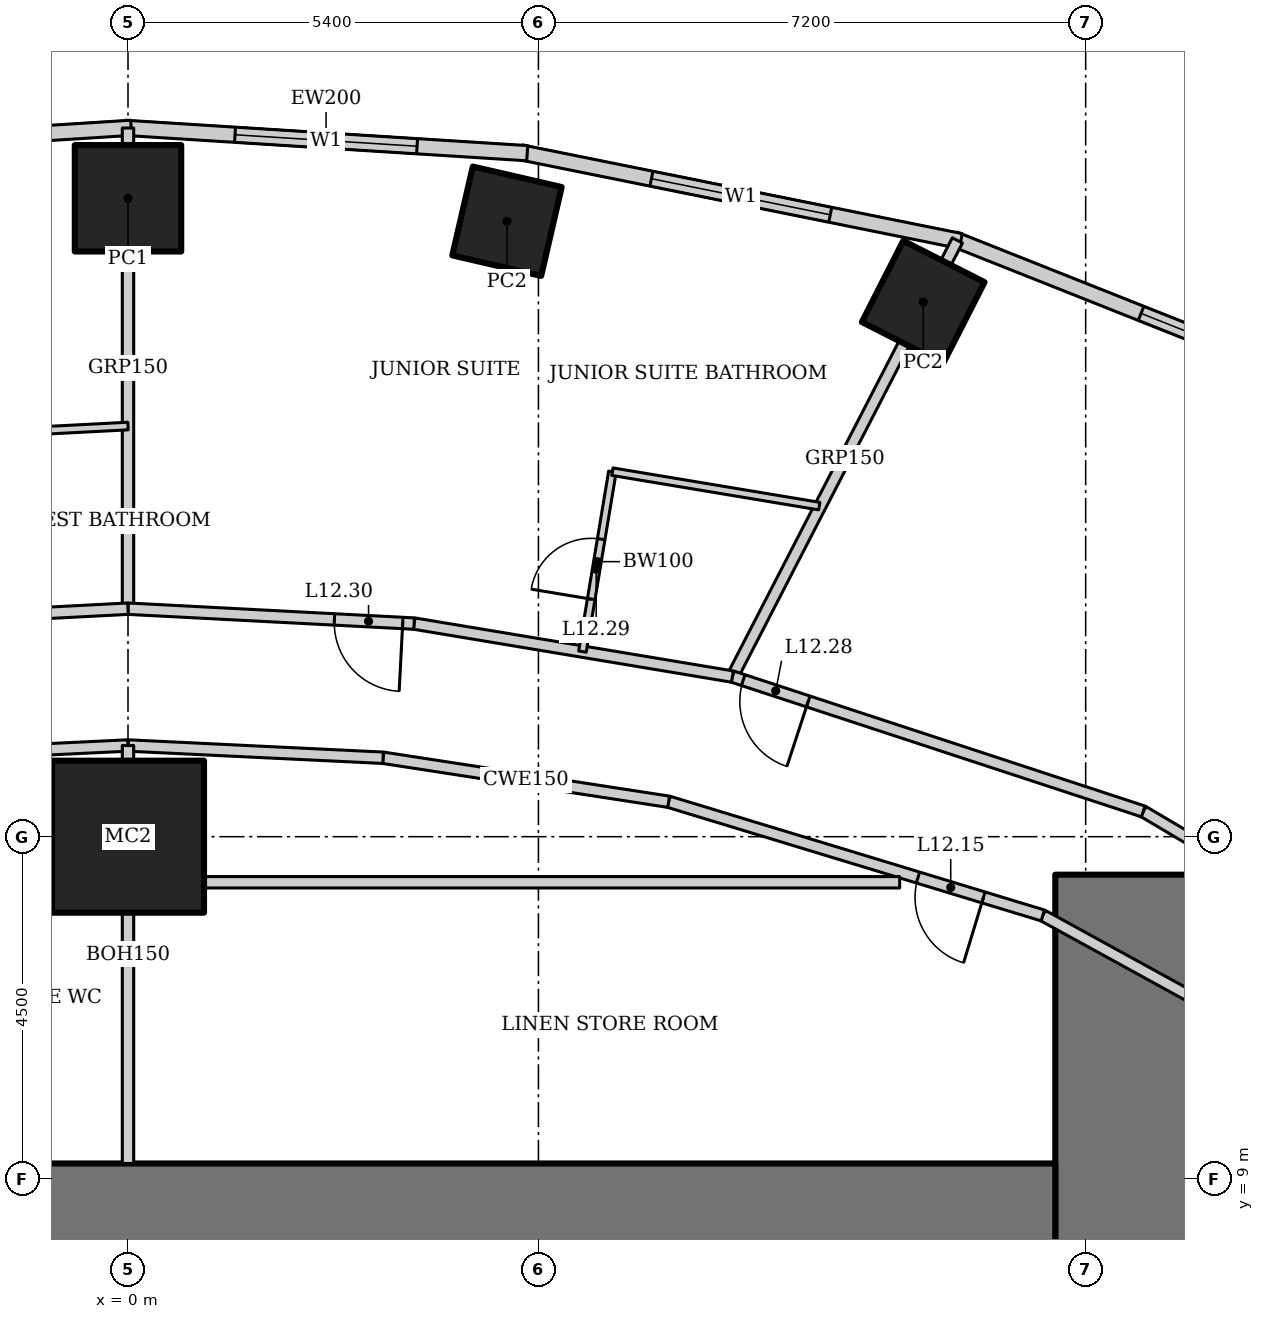
"""IFC4 building model, lengths in metres.
Left out: names, types, materials, properties, quantities, classifications, styles, units other than length and angle.
Written with IfcOpenShell. Run it as: python <this file> out.ifc"""

import sys

from ifc_helpers import new_model, si_unit, direction, frame, frame_2d, origin, origin_2d, place, context, subcontext, project, spatial, rectangle, hollow_rectangle, extrude, element, fill, save


model = new_model("IFC4")
c1 = context("Model", 3, precision=1e-05, world=origin(), true_north=direction((0.0, 1.0)))
c2 = subcontext(c1, "Body", "Model", "MODEL_VIEW")
j1 = project(units=[si_unit("LENGTHUNIT", "METRE"), si_unit("PLANEANGLEUNIT", "RADIAN")], contexts=[c1])
p1 = place(None, origin())
s1 = spatial("IfcSite", under=j1, at=p1, CompositionType="ELEMENT")
p2 = place(p1, origin())
s2 = spatial("IfcBuilding", under=s1, at=p2, CompositionType="ELEMENT")
p3 = place(p2, frame((0.0, 0.0, 58.6)))
s3 = spatial("IfcBuildingStorey", under=s2, at=p3, CompositionType="ELEMENT", Elevation=58.6)
p4 = place(p3, frame((0.0, 13.5, 0.0), z_axis=(0.0, 0.0, 1.0), x_axis=(1.0, 0.0, 0.0)))
e1 = element("IfcColumn", 1, at=p4, inside=s3, PredefinedType="COLUMN", context=c2, shape_type="SweptSolid", body=[
    extrude(hollow_rectangle(XDim=2.0, YDim=2.0, WallThickness=0.17, at=origin_2d()), origin(), (0.0, 0.0, 1.0), 3.6),
])
for number, where, z_axis, x_axis in (
    (2, (10.463, 20.534, 0.0), (0.0, 0.0, 1.0), (0.454, 0.891, 0.0)),
    (3, (4.986, 21.598, 0.0), (0.0, 0.0, 1.0), (0.225, 0.974, 0.0)),
):
    element("IfcColumn", number, at=place(p3, frame(where, z_axis=z_axis, x_axis=x_axis)), inside=s3, PredefinedType="COLUMN", context=c2, shape_type="SweptSolid", body=[
        extrude(hollow_rectangle(XDim=1.2, YDim=1.2, WallThickness=0.1, at=origin_2d()), origin(), (0.0, 0.0, 1.0), 3.6),
    ])
p5 = place(p3, frame((0.0, 21.9, 0.0), z_axis=(0.0, 0.0, 1.0), x_axis=(1.0, 0.0, 0.0)))
e4 = element("IfcColumn", 4, at=p5, inside=s3, PredefinedType="COLUMN", context=c2, shape_type="SweptSolid", body=[
    extrude(hollow_rectangle(XDim=1.4, YDim=1.4, WallThickness=0.1, at=origin_2d()), origin(), (0.0, 0.0, 1.0), 3.6),
])
p6 = place(p3, frame((13.2, -13.0, 0.0), z_axis=(0.0, 0.0, 1.0), x_axis=(0.0, 1.0, 0.0)))
e5 = element("IfcWall", 5, at=p6, inside=s3, PredefinedType="SHEAR", context=c2, shape_type="SweptSolid", body=[
    extrude(rectangle(XDim=26.0, YDim=2.0, at=frame_2d((13.0, 0.0))), origin(), (0.0, 0.0, 1.0), 3.6),
])
p7 = place(p6, frame((12.1, 0.0, 0.0)))
e6 = element("IfcOpeningElement", 6, at=p7, cuts=e5, PredefinedType="OPENING", context=c2, shape_type="SweptSolid", body=[
    extrude(rectangle(XDim=1.8, YDim=2.1, at=frame_2d((0.9, 1.05))), frame((0.0, 1.01, 0.0), z_axis=(0.0, -1.0, 0.0), x_axis=(1.0, 0.0, 0.0)), (0.0, 0.0, 1.0), 2.02),
])
p8 = place(p3, frame((12.2, 8.0, 0.0), z_axis=(0.0, 0.0, 1.0), x_axis=(-1.0, 0.0, 0.0)))
e7 = element("IfcWall", 7, at=p8, inside=s3, PredefinedType="SHEAR", context=c2, shape_type="SweptSolid", body=[
    extrude(rectangle(XDim=24.4, YDim=2.4, at=frame_2d((12.2, 0.0))), origin(), (0.0, 0.0, 1.0), 3.6),
])
p9 = place(p3, frame((18.018, 18.523, 0.0), z_axis=(0.0, 0.0, 1.0), x_axis=(-0.929358351251, 0.369178892895, 0.0)))
e8 = element("IfcWall", 8, at=p9, inside=s3, PredefinedType="SOLIDWALL", context=c2, shape_type="SweptSolid", body=[
    extrude(rectangle(XDim=7.692, YDim=0.2, at=frame_2d((3.846, 0.0))), origin(), (0.0, 0.0, 1.0), 3.45),
])
p10 = place(p9, frame((2.646, 0.0, 0.5)))
e9 = element("IfcOpeningElement", 9, at=p10, cuts=e8, PredefinedType="OPENING", context=c2, shape_type="SweptSolid", body=[
    extrude(rectangle(XDim=2.4, YDim=2.2, at=frame_2d((1.2, 1.1))), frame((0.0, 0.11, 0.0), z_axis=(0.0, -1.0, 0.0), x_axis=(1.0, 0.0, 0.0)), (0.0, 0.0, 1.0), 0.22),
])
p11 = place(p3, frame((10.957, 21.337, 0.0), z_axis=(0.0, 0.0, 1.0), x_axis=(-0.980251657452, 0.197754110105, 0.0)))
e10 = element("IfcWall", 10, at=p11, inside=s3, PredefinedType="SOLIDWALL", context=c2, shape_type="SweptSolid", body=[
    extrude(rectangle(XDim=5.904, YDim=0.2, at=frame_2d((2.952, 0.0))), origin(), (0.0, 0.0, 1.0), 3.45),
])
p12 = place(p11, frame((1.752, 0.0, 0.5)))
e11 = element("IfcOpeningElement", 11, at=p12, cuts=e10, PredefinedType="OPENING", context=c2, shape_type="SweptSolid", body=[
    extrude(rectangle(XDim=2.4, YDim=2.2, at=frame_2d((1.2, 1.1))), frame((0.0, 0.11, 0.0), z_axis=(0.0, -1.0, 0.0), x_axis=(1.0, 0.0, 0.0)), (0.0, 0.0, 1.0), 0.22),
])
p13 = place(p3, frame((5.253, 22.493, 0.0), z_axis=(0.0, 0.0, 1.0), x_axis=(-0.998018582375, 0.062919863585, 0.0)))
e12 = element("IfcWall", 12, at=p13, inside=s3, PredefinedType="SOLIDWALL", context=c2, shape_type="SweptSolid", body=[
    extrude(rectangle(XDim=5.304, YDim=0.2, at=frame_2d((2.652, 0.0))), origin(), (0.0, 0.0, 1.0), 3.45),
])
p14 = place(p13, frame((1.452, 0.0, 0.5)))
e13 = element("IfcOpeningElement", 13, at=p14, cuts=e12, PredefinedType="OPENING", context=c2, shape_type="SweptSolid", body=[
    extrude(rectangle(XDim=2.4, YDim=2.2, at=frame_2d((1.2, 1.1))), frame((0.0, 0.11, 0.0), z_axis=(0.0, -1.0, 0.0), x_axis=(1.0, 0.0, 0.0)), (0.0, 0.0, 1.0), 0.22),
])
p15 = place(p3, frame((0.041, 22.827, 0.0), z_axis=(0.0, 0.0, 1.0), x_axis=(-0.998018582375, -0.062919863585, 0.0)))
e14 = element("IfcWall", 14, at=p15, inside=s3, PredefinedType="SOLIDWALL", context=c2, shape_type="SweptSolid", body=[
    extrude(rectangle(XDim=5.304, YDim=0.2, at=frame_2d((2.652, 0.0))), origin(), (0.0, 0.0, 1.0), 3.45),
])
p16 = place(p15, frame((1.452, 0.0, 0.5)))
e15 = element("IfcOpeningElement", 15, at=p16, cuts=e14, PredefinedType="OPENING", context=c2, shape_type="SweptSolid", body=[
    extrude(rectangle(XDim=2.4, YDim=2.2, at=frame_2d((1.2, 1.1))), frame((0.0, 0.11, 0.0), z_axis=(0.0, -1.0, 0.0), x_axis=(1.0, 0.0, 0.0)), (0.0, 0.0, 1.0), 0.22),
])
p17 = place(p3, frame((10.912, 21.346, 0.0), z_axis=(0.0, 0.0, 1.0), x_axis=(-0.458384799126, -0.888753833145, 0.0)))
e16 = element("IfcWall", 16, at=p17, inside=s3, PredefinedType="PARTITIONING", context=c2, shape_type="SweptSolid", body=[
    extrude(rectangle(XDim=6.457, YDim=0.15, at=frame_2d((3.229, 0.0))), origin(), (0.0, 0.0, 1.0), 2.528),
])
p18 = place(p3, frame((0.0, 22.825, 0.0), z_axis=(0.0, 0.0, 1.0), x_axis=(0.0, -1.0, 0.0)))
e17 = element("IfcWall", 17, at=p18, inside=s3, PredefinedType="PARTITIONING", context=c2, shape_type="SweptSolid", body=[
    extrude(rectangle(XDim=6.325, YDim=0.15, at=frame_2d((3.162, 0.0))), origin(), (0.0, 0.0, 1.0), 2.924),
])
p19 = place(p3, frame((18.681, 10.675, 0.0), z_axis=(0.0, 0.0, 1.0), x_axis=(-0.860147339762, 0.510045639036, 0.0)))
e18 = element("IfcWall", 18, at=p19, inside=s3, PredefinedType="PARTITIONING", context=c2, shape_type="SweptSolid", body=[
    extrude(rectangle(XDim=6.19, YDim=0.15, at=frame_2d((3.095, 0.0))), origin(), (0.0, 0.0, 1.0), 3.45),
])
p20 = place(p3, frame((13.357, 13.832, 0.0), z_axis=(0.0, 0.0, 1.0), x_axis=(-0.950106803111, 0.311924770869, 0.0)))
e19 = element("IfcWall", 19, at=p20, inside=s3, PredefinedType="PARTITIONING", context=c2, shape_type="SweptSolid", body=[
    extrude(rectangle(XDim=5.689, YDim=0.15, at=frame_2d((2.845, 0.0))), origin(), (0.0, 0.0, 1.0), 3.45),
])
p21 = place(p20, frame((4.639, 0.0, 0.0)))
e20 = element("IfcOpeningElement", 20, at=p21, cuts=e19, PredefinedType="OPENING", context=c2, shape_type="SweptSolid", body=[
    extrude(rectangle(XDim=0.9, YDim=2.1, at=frame_2d((0.45, 1.05))), frame((0.0, 0.085, 0.0), z_axis=(0.0, -1.0, 0.0), x_axis=(1.0, 0.0, 0.0)), (0.0, 0.0, 1.0), 0.17),
])
p22 = place(p3, frame((7.952, 15.607, 0.0), z_axis=(0.0, 0.0, 1.0), x_axis=(-0.98641101506, 0.164296407044, 0.0)))
e21 = element("IfcWall", 21, at=p22, inside=s3, PredefinedType="PARTITIONING", context=c2, shape_type="SweptSolid", body=[
    extrude(rectangle(XDim=4.245, YDim=0.15, at=frame_2d((2.123, 0.0))), origin(), (0.0, 0.0, 1.0), 3.45),
])
p23 = place(p3, frame((3.764, 16.304, 0.0), z_axis=(0.0, 0.0, 1.0), x_axis=(-0.998649848759, 0.05194689186, 0.0)))
e22 = element("IfcWall", 22, at=p23, inside=s3, PredefinedType="PARTITIONING", context=c2, shape_type="SweptSolid", body=[
    extrude(rectangle(XDim=3.769, YDim=0.15, at=frame_2d((1.885, 0.0))), origin(), (0.0, 0.0, 1.0), 3.45),
])
p24 = place(p23, frame((0.15, 0.0, 0.0)))
e23 = element("IfcOpeningElement", 23, at=p24, cuts=e22, PredefinedType="OPENING", context=c2, shape_type="SweptSolid", body=[
    extrude(rectangle(XDim=0.9, YDim=2.1, at=frame_2d((0.45, 1.05))), frame((0.0, 0.085, 0.0), z_axis=(0.0, -1.0, 0.0), x_axis=(1.0, 0.0, 0.0)), (0.0, 0.0, 1.0), 0.17),
])
p25 = place(p3, frame((0.0, 16.5, 0.0), z_axis=(0.0, 0.0, 1.0), x_axis=(-0.998649848759, -0.05194689186, 0.0)))
e24 = element("IfcWall", 24, at=p25, inside=s3, PredefinedType="PARTITIONING", context=c2, shape_type="SweptSolid", body=[
    extrude(rectangle(XDim=3.769, YDim=0.15, at=frame_2d((1.885, 0.0))), origin(), (0.0, 0.0, 1.0), 3.45),
])
p26 = place(p25, frame((2.719, 0.0, 0.0)))
e25 = element("IfcOpeningElement", 25, at=p26, cuts=e24, PredefinedType="OPENING", context=c2, shape_type="SweptSolid", body=[
    extrude(rectangle(XDim=0.9, YDim=2.1, at=frame_2d((0.45, 1.05))), frame((0.0, 0.085, 0.0), z_axis=(0.0, -1.0, 0.0), x_axis=(1.0, 0.0, 0.0)), (0.0, 0.0, 1.0), 0.17),
])
p27 = place(p3, frame((17.021, 9.726, 0.0), z_axis=(0.0, 0.0, 1.0), x_axis=(-0.876522084062, 0.481361647986, 0.0)))
e26 = element("IfcWall", 26, at=p27, inside=s3, PredefinedType="PARTITIONING", context=c2, shape_type="SweptSolid", body=[
    extrude(rectangle(XDim=5.687, YDim=0.15, at=frame_2d((2.844, 0.0))), origin(), (0.0, 0.0, 1.0), 3.45),
])
p28 = place(p3, frame((12.036, 12.464, 0.0), z_axis=(0.0, 0.0, 1.0), x_axis=(-0.956795045135, 0.290763205385, 0.0)))
e27 = element("IfcWall", 27, at=p28, inside=s3, PredefinedType="PARTITIONING", context=c2, shape_type="SweptSolid", body=[
    extrude(rectangle(XDim=5.146, YDim=0.15, at=frame_2d((2.573, 0.0))), origin(), (0.0, 0.0, 1.0), 3.45),
])
p29 = place(p28, frame((0.816, 0.0, 0.0)))
e28 = element("IfcOpeningElement", 28, at=p29, cuts=e27, PredefinedType="OPENING", context=c2, shape_type="SweptSolid", body=[
    extrude(rectangle(XDim=0.9, YDim=2.1, at=frame_2d((0.45, 1.05))), frame((0.0, 0.085, 0.0), z_axis=(0.0, -1.0, 0.0), x_axis=(1.0, 0.0, 0.0)), (0.0, 0.0, 1.0), 0.17),
])
p30 = place(p3, frame((7.113, 13.96, 0.0), z_axis=(0.0, 0.0, 1.0), x_axis=(-0.988343461108, 0.152240608529, 0.0)))
e29 = element("IfcWall", 29, at=p30, inside=s3, PredefinedType="PARTITIONING", context=c2, shape_type="SweptSolid", body=[
    extrude(rectangle(XDim=3.801, YDim=0.15, at=frame_2d((1.9, 0.0))), origin(), (0.0, 0.0, 1.0), 3.45),
])
p31 = place(p3, frame((3.356, 14.538, 0.0), z_axis=(0.0, 0.0, 1.0), x_axis=(-0.998842682549, 0.048096730859, 0.0)))
e30 = element("IfcWall", 30, at=p31, inside=s3, PredefinedType="PARTITIONING", context=c2, shape_type="SweptSolid", body=[
    extrude(rectangle(XDim=3.36, YDim=0.15, at=frame_2d((1.68, 0.0))), origin(), (0.0, 0.0, 1.0), 3.45),
])
p32 = place(p3, frame((0.0, 14.7, 0.0), z_axis=(0.0, 0.0, 1.0), x_axis=(-0.998842682549, -0.048096730859, 0.0)))
e31 = element("IfcWall", 31, at=p32, inside=s3, PredefinedType="PARTITIONING", context=c2, shape_type="SweptSolid", body=[
    extrude(rectangle(XDim=3.36, YDim=0.15, at=frame_2d((1.68, 0.0))), origin(), (0.0, 0.0, 1.0), 3.45),
])
p33 = place(p32, frame((1.125, 0.0, 0.0)))
e32 = element("IfcOpeningElement", 32, at=p33, cuts=e31, PredefinedType="OPENING", context=c2, shape_type="SweptSolid", body=[
    extrude(rectangle(XDim=1.0, YDim=2.1, at=frame_2d((0.5, 1.05))), frame((0.0, 0.085, 0.0), z_axis=(0.0, -1.0, 0.0), x_axis=(1.0, 0.0, 0.0)), (0.0, 0.0, 1.0), 0.17),
])
p34 = place(p3, frame((0.0, 9.2, 0.0), z_axis=(0.0, 0.0, 1.0), x_axis=(0.0, 1.0, 0.0)))
e33 = element("IfcWall", 33, at=p34, inside=s3, PredefinedType="PARTITIONING", context=c2, shape_type="SweptSolid", body=[
    extrude(rectangle(XDim=5.5, YDim=0.15, at=frame_2d((2.75, 0.0))), origin(), (0.0, 0.0, 1.0), 2.924),
])
p35 = place(p3, frame((10.153, 12.9, 0.0), z_axis=(0.0, 0.0, 1.0), x_axis=(-1.0, 0.0, 0.0)))
e34 = element("IfcWall", 34, at=p35, inside=s3, PredefinedType="PARTITIONING", context=c2, shape_type="SweptSolid", body=[
    extrude(rectangle(XDim=10.153, YDim=0.15, at=frame_2d((5.076, 0.0))), origin(), (0.0, 0.0, 1.0), 3.45),
])
p36 = place(p3, frame((5.979, 15.935, 0.0), z_axis=(0.0, 0.0, 1.0), x_axis=(0.164283516215, 0.986413162067, 0.0)))
e35 = element("IfcWall", 35, at=p36, inside=s3, PredefinedType="PARTITIONING", context=c2, shape_type="SweptSolid", body=[
    extrude(rectangle(XDim=2.4, YDim=0.1, at=frame_2d((1.2, 0.0))), origin(), (0.0, 0.0, 1.0), 2.914),
])
p37 = place(p36, frame((0.7, 0.0, 0.0)))
e36 = element("IfcOpeningElement", 36, at=p37, cuts=e35, PredefinedType="OPENING", context=c2, shape_type="SweptSolid", body=[
    extrude(rectangle(XDim=0.8, YDim=2.1, at=frame_2d((0.4, 1.05))), frame((0.0, 0.06, 0.0), z_axis=(0.0, -1.0, 0.0), x_axis=(1.0, 0.0, 0.0)), (0.0, 0.0, 1.0), 0.12),
])
p38 = place(p3, frame((6.374, 18.303, 0.0), z_axis=(0.0, 0.0, 1.0), x_axis=(0.98640348956, -0.164341582641, 0.0)))
e37 = element("IfcWall", 37, at=p38, inside=s3, PredefinedType="PARTITIONING", context=c2, shape_type="SweptSolid", body=[
    extrude(rectangle(XDim=2.759, YDim=0.1, at=frame_2d((1.379, 0.0))), origin(), (0.0, 0.0, 1.0), 3.45),
])
p39 = place(p3, frame((-2.122, 18.793, 0.0), z_axis=(0.0, 0.0, 1.0), x_axis=(0.998644675281, 0.052046253785, 0.0)))
e38 = element("IfcWall", 38, at=p39, inside=s3, PredefinedType="PARTITIONING", context=c2, shape_type="SweptSolid", body=[
    extrude(rectangle(XDim=2.125, YDim=0.1, at=frame_2d((1.062, 0.0))), origin(), (0.0, 0.0, 1.0), 3.45),
])
p40 = place(p10, origin())
e39 = element("IfcWindow", 39, at=p40, inside=s3, PartitioningType="SINGLE_PANEL", PredefinedType="WINDOW", context=c2, shape_type="SweptSolid", body=[
    extrude(rectangle(XDim=2.4, YDim=2.2, at=frame_2d((1.2, 1.1))), frame((0.0, 0.03, 0.0), z_axis=(0.0, -1.0, 0.0), x_axis=(1.0, 0.0, 0.0)), (0.0, 0.0, 1.0), 0.06),
])
fill(e9, e39)
p41 = place(p12, origin())
e40 = element("IfcWindow", 40, at=p41, inside=s3, PartitioningType="SINGLE_PANEL", PredefinedType="WINDOW", context=c2, shape_type="SweptSolid", body=[
    extrude(rectangle(XDim=2.4, YDim=2.2, at=frame_2d((1.2, 1.1))), frame((0.0, 0.03, 0.0), z_axis=(0.0, -1.0, 0.0), x_axis=(1.0, 0.0, 0.0)), (0.0, 0.0, 1.0), 0.06),
])
fill(e11, e40)
p42 = place(p14, origin())
e41 = element("IfcWindow", 41, at=p42, inside=s3, PartitioningType="SINGLE_PANEL", PredefinedType="WINDOW", context=c2, shape_type="SweptSolid", body=[
    extrude(rectangle(XDim=2.4, YDim=2.2, at=frame_2d((1.2, 1.1))), frame((0.0, 0.03, 0.0), z_axis=(0.0, -1.0, 0.0), x_axis=(1.0, 0.0, 0.0)), (0.0, 0.0, 1.0), 0.06),
])
fill(e13, e41)
p43 = place(p29, origin())
e42 = element("IfcDoor", 42, at=p43, inside=s3, OperationType="SINGLE_SWING_LEFT", PredefinedType="DOOR", context=c2, shape_type="SweptSolid", body=[
    extrude(rectangle(XDim=0.9, YDim=2.1, at=frame_2d((0.45, 1.05))), frame((0.0, 0.025, 0.0), z_axis=(0.0, -1.0, 0.0), x_axis=(1.0, 0.0, 0.0)), (0.0, 0.0, 1.0), 0.05),
])
fill(e28, e42)
p44 = place(p21, origin())
e43 = element("IfcDoor", 43, at=p44, inside=s3, OperationType="SINGLE_SWING_LEFT", PredefinedType="DOOR", context=c2, shape_type="SweptSolid", body=[
    extrude(rectangle(XDim=0.9, YDim=2.1, at=frame_2d((0.45, 1.05))), frame((0.0, 0.025, 0.0), z_axis=(0.0, -1.0, 0.0), x_axis=(1.0, 0.0, 0.0)), (0.0, 0.0, 1.0), 0.05),
])
fill(e20, e43)
p45 = place(p37, origin())
e44 = element("IfcDoor", 44, at=p45, inside=s3, OperationType="SINGLE_SWING_LEFT", PredefinedType="DOOR", context=c2, shape_type="SweptSolid", body=[
    extrude(rectangle(XDim=0.8, YDim=2.1, at=frame_2d((0.4, 1.05))), frame((0.0, 0.025, 0.0), z_axis=(0.0, -1.0, 0.0), x_axis=(1.0, 0.0, 0.0)), (0.0, 0.0, 1.0), 0.05),
])
fill(e36, e44)
p46 = place(p24, origin())
e45 = element("IfcDoor", 45, at=p46, inside=s3, OperationType="SINGLE_SWING_LEFT", PredefinedType="DOOR", context=c2, shape_type="SweptSolid", body=[
    extrude(rectangle(XDim=0.9, YDim=2.1, at=frame_2d((0.45, 1.05))), frame((0.0, 0.025, 0.0), z_axis=(0.0, -1.0, 0.0), x_axis=(1.0, 0.0, 0.0)), (0.0, 0.0, 1.0), 0.05),
])
fill(e23, e45)
save(model, sys.argv[1])
